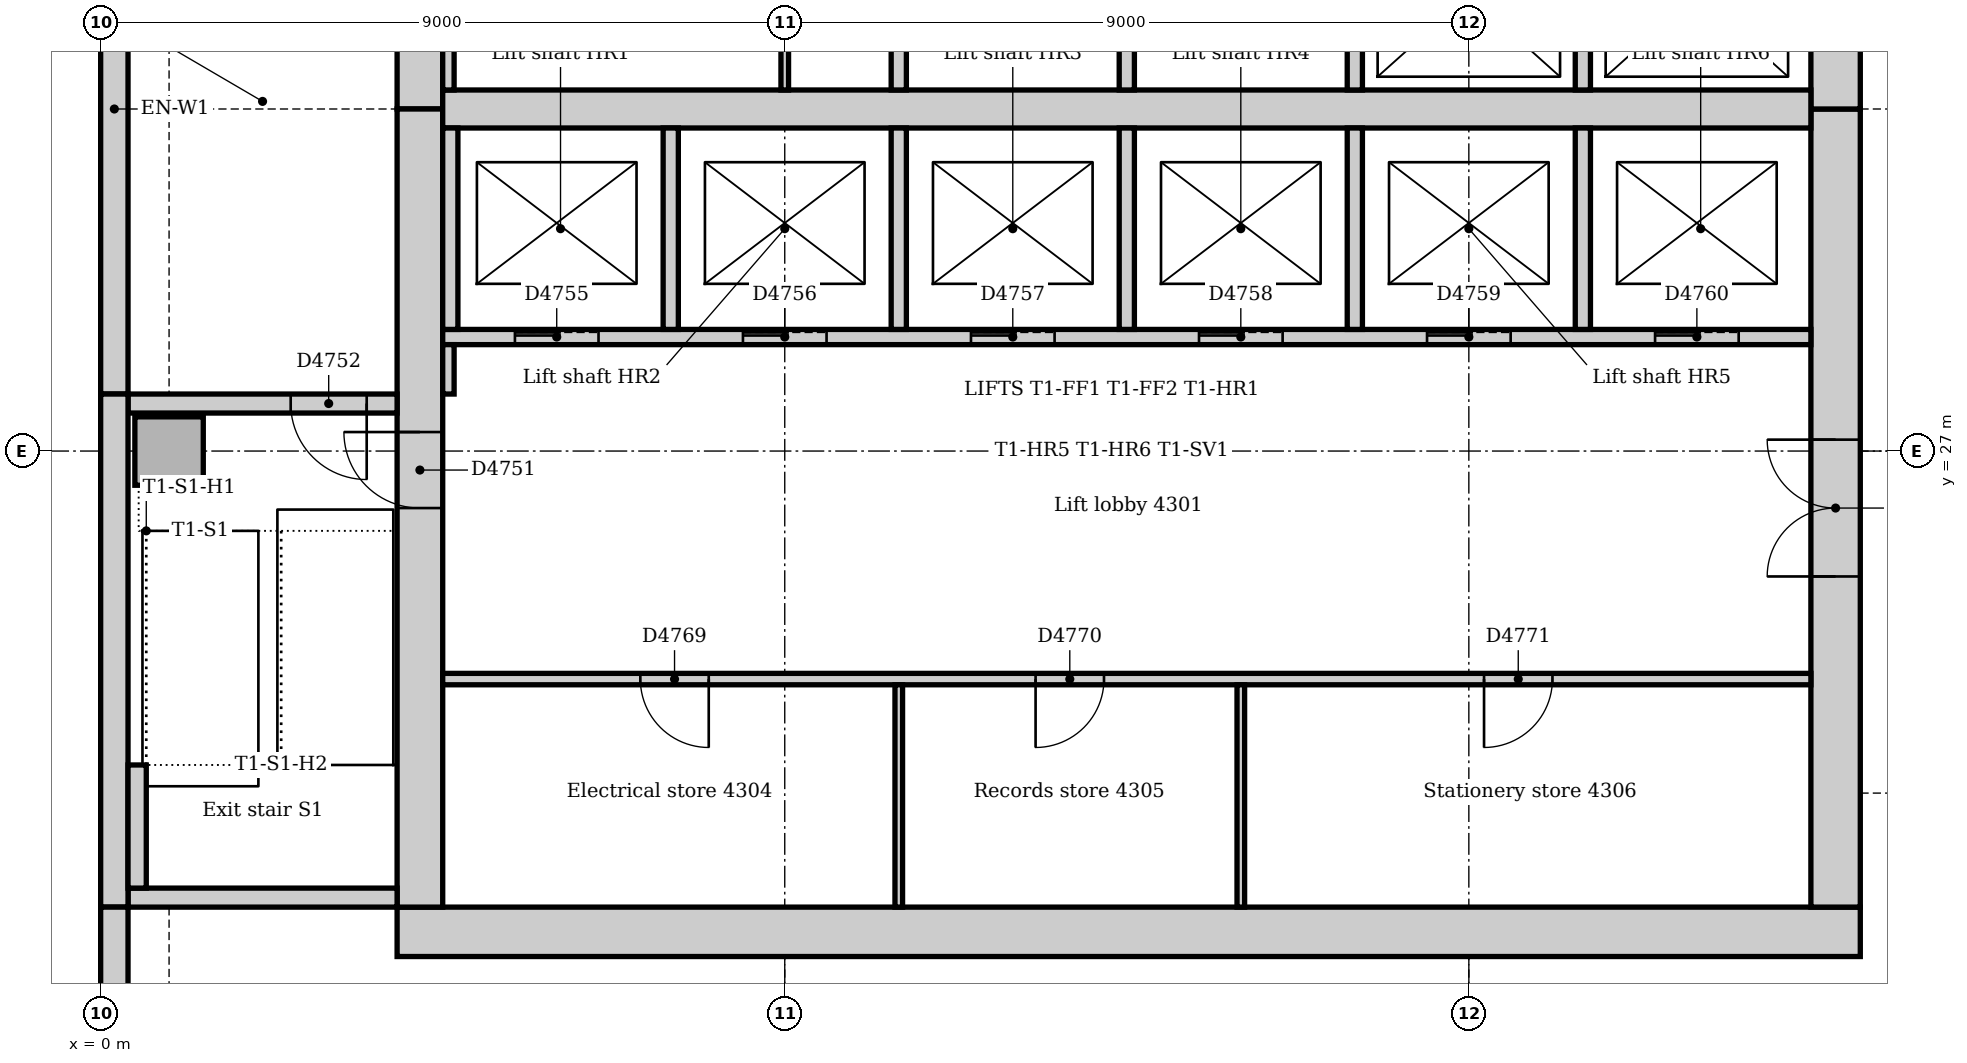
"""IFC4 building model, lengths in metres.
Left out: names, types, materials, properties, quantities, classifications, styles, units other than length and angle.
Written with IfcOpenShell. Run it as: python <this file> out.ifc"""

import sys

from ifc_helpers import new_model, si_unit, direction, frame, frame_2d, origin, origin_2d, place, context, subcontext, project, spatial, rectangle, extrude, element, fill, save


model = new_model("IFC4")
c1 = context("Model", 3, precision=1e-05, world=origin(), true_north=direction((0.0, 1.0)))
c2 = subcontext(c1, "Body", "Model", "MODEL_VIEW")
j1 = project(units=[si_unit("LENGTHUNIT", "METRE"), si_unit("PLANEANGLEUNIT", "RADIAN")], contexts=[c1])
p1 = place(None, origin())
s1 = spatial("IfcSite", under=j1, at=p1, CompositionType="ELEMENT")
p2 = place(p1, origin())
s2 = spatial("IfcBuilding", under=s1, at=p2, CompositionType="ELEMENT")
p3 = place(p2, frame((0.0, 0.0, 181.0)))
s3 = spatial("IfcBuildingStorey", under=s2, at=p3, CompositionType="ELEMENT", Elevation=181.0)
p4 = place(p3, frame((3.9, 20.675, 0.0), z_axis=(0.0, 0.0, 1.0), x_axis=(1.0, 0.0, 0.0)))
e1 = element("IfcWall", 1, at=p4, inside=s3, PredefinedType="SOLIDWALL", context=c2, shape_type="SweptSolid", body=[
    extrude(rectangle(XDim=19.25, YDim=0.65, at=frame_2d((9.625, 0.0))), origin(), (0.0, 0.0, 1.0), 4.0),
])
p5 = place(p3, frame((22.825, 21.0, 0.0), z_axis=(0.0, 0.0, 1.0), x_axis=(0.0, 1.0, 0.0)))
e2 = element("IfcWall", 2, at=p5, inside=s3, PredefinedType="SOLIDWALL", context=c2, shape_type="SweptSolid", body=[
    extrude(rectangle(XDim=10.5, YDim=0.65, at=frame_2d((5.25, 0.0))), origin(), (0.0, 0.0, 1.0), 4.0),
])
p6 = place(p5, frame((4.35, 0.0, 0.0)))
e3 = element("IfcOpeningElement", 3, at=p6, cuts=e2, PredefinedType="OPENING", context=c2, shape_type="SweptSolid", body=[
    extrude(rectangle(XDim=1.8, YDim=2.1, at=frame_2d((0.9, 1.05))), frame((0.0, 0.335, 0.0), z_axis=(0.0, -1.0, 0.0), x_axis=(1.0, 0.0, 0.0)), (0.0, 0.0, 1.0), 0.67),
])
p7 = place(p3, frame((22.825, 31.5, 0.0), z_axis=(0.0, 0.0, 1.0), x_axis=(0.0, 1.0, 0.0)))
e4 = element("IfcWall", 4, at=p7, inside=s3, PredefinedType="SOLIDWALL", context=c2, shape_type="SweptSolid", body=[
    extrude(rectangle(XDim=10.5, YDim=0.65, at=frame_2d((5.25, 0.0))), origin(), (0.0, 0.0, 1.0), 4.0),
])
p8 = place(p7, frame((3.15, 0.0, 0.0)))
e5 = element("IfcOpeningElement", 5, at=p8, cuts=e4, PredefinedType="OPENING", context=c2, shape_type="SweptSolid", body=[
    extrude(rectangle(XDim=1.0, YDim=2.1, at=frame_2d((0.5, 1.05))), frame((0.0, 0.335, 0.0), z_axis=(0.0, -1.0, 0.0), x_axis=(1.0, 0.0, 0.0)), (0.0, 0.0, 1.0), 0.67),
])
p9 = place(p7, frame((5.2, 0.0, 0.0)))
e6 = element("IfcOpeningElement", 6, at=p9, cuts=e4, PredefinedType="OPENING", context=c2, shape_type="SweptSolid", body=[
    extrude(rectangle(XDim=1.0, YDim=2.1, at=frame_2d((0.5, 1.05))), frame((0.0, 0.335, 0.0), z_axis=(0.0, -1.0, 0.0), x_axis=(1.0, 0.0, 0.0)), (0.0, 0.0, 1.0), 0.67),
])
p10 = place(p3, frame((4.2, 42.0, 0.0), z_axis=(0.0, 0.0, 1.0), x_axis=(0.0, -1.0, 0.0)))
e7 = element("IfcWall", 7, at=p10, inside=s3, PredefinedType="SOLIDWALL", context=c2, shape_type="SweptSolid", body=[
    extrude(rectangle(XDim=10.5, YDim=0.6, at=frame_2d((5.25, 0.0))), origin(), (0.0, 0.0, 1.0), 4.0),
])
p11 = place(p10, frame((5.3, 0.0, 0.0)))
e8 = element("IfcOpeningElement", 8, at=p11, cuts=e7, PredefinedType="OPENING", context=c2, shape_type="SweptSolid", body=[
    extrude(rectangle(XDim=1.0, YDim=2.1, at=frame_2d((0.5, 1.05))), frame((0.0, 0.31, 0.0), z_axis=(0.0, -1.0, 0.0), x_axis=(1.0, 0.0, 0.0)), (0.0, 0.0, 1.0), 0.62),
])
p12 = place(p3, frame((4.2, 31.5, 0.0), z_axis=(0.0, 0.0, 1.0), x_axis=(0.0, -1.0, 0.0)))
e9 = element("IfcWall", 9, at=p12, inside=s3, PredefinedType="SOLIDWALL", context=c2, shape_type="SweptSolid", body=[
    extrude(rectangle(XDim=10.5, YDim=0.6, at=frame_2d((5.25, 0.0))), origin(), (0.0, 0.0, 1.0), 4.0),
])
p13 = place(p12, frame((4.25, 0.0, 0.0)))
e10 = element("IfcOpeningElement", 10, at=p13, cuts=e9, PredefinedType="OPENING", context=c2, shape_type="SweptSolid", body=[
    extrude(rectangle(XDim=1.0, YDim=2.1, at=frame_2d((0.5, 1.05))), frame((0.0, 0.31, 0.0), z_axis=(0.0, -1.0, 0.0), x_axis=(1.0, 0.0, 0.0)), (0.0, 0.0, 1.0), 0.62),
])
p14 = place(p3, frame((4.5, 31.5, 0.0), z_axis=(0.0, 0.0, 1.0), x_axis=(1.0, 0.0, 0.0)))
e11 = element("IfcWall", 11, at=p14, inside=s3, PredefinedType="SOLIDWALL", context=c2, shape_type="SweptSolid", body=[
    extrude(rectangle(XDim=18.0, YDim=0.5, at=frame_2d((9.0, 0.0))), origin(), (0.0, 0.0, 1.0), 4.0),
])
p15 = place(p3, frame((0.36, 21.125, 0.0), z_axis=(0.0, 0.0, 1.0), x_axis=(1.0, 0.0, 0.0)))
e12 = element("IfcWall", 12, at=p15, inside=s3, PredefinedType="SOLIDWALL", context=c2, shape_type="SweptSolid", body=[
    extrude(rectangle(XDim=3.54, YDim=0.25, at=frame_2d((1.77, 0.0))), origin(), (0.0, 0.0, 1.0), 4.0),
])
p16 = place(p3, frame((3.9, 27.625, 0.0), z_axis=(0.0, 0.0, 1.0), x_axis=(-1.0, 0.0, 0.0)))
e13 = element("IfcWall", 13, at=p16, inside=s3, PredefinedType="SOLIDWALL", context=c2, shape_type="SweptSolid", body=[
    extrude(rectangle(XDim=3.54, YDim=0.25, at=frame_2d((1.77, 0.0))), origin(), (0.0, 0.0, 1.0), 4.0),
])
p17 = place(p16, frame((0.4, 0.0, 0.0)))
e14 = element("IfcOpeningElement", 14, at=p17, cuts=e13, PredefinedType="OPENING", context=c2, shape_type="SweptSolid", body=[
    extrude(rectangle(XDim=1.0, YDim=2.1, at=frame_2d((0.5, 1.05))), frame((0.0, 0.135, 0.0), z_axis=(0.0, -1.0, 0.0), x_axis=(1.0, 0.0, 0.0)), (0.0, 0.0, 1.0), 0.27),
])
p18 = place(p3, frame((0.9, 27.0, 0.0), z_axis=(0.0, 0.0, 1.0), x_axis=(1.0, 0.0, 0.0)))
e15 = element("IfcColumn", 15, at=p18, inside=s3, PredefinedType="COLUMN", context=c2, shape_type="SweptSolid", body=[
    extrude(rectangle(XDim=0.9, YDim=0.9, at=origin_2d()), origin(), (0.0, 0.0, 1.0), 4.0),
])
p19 = place(p3, frame((0.18, 35.25, 0.0), z_axis=(0.0, 0.0, 1.0), x_axis=(0.0, -1.0, 0.0)))
e16 = element("IfcWall", 16, at=p19, inside=s3, PredefinedType="STANDARD", context=c2, shape_type="SweptSolid", body=[
    extrude(rectangle(XDim=7.5, YDim=0.36, at=frame_2d((3.75, 0.0))), origin(), (0.0, 0.0, 1.0), 3.85),
])
p20 = place(p3, frame((0.18, 27.75, 0.0), z_axis=(0.0, 0.0, 1.0), x_axis=(0.0, -1.0, 0.0)))
e17 = element("IfcWall", 17, at=p20, inside=s3, PredefinedType="STANDARD", context=c2, shape_type="SweptSolid", body=[
    extrude(rectangle(XDim=6.75, YDim=0.36, at=frame_2d((3.375, 0.0))), origin(), (0.0, 0.0, 1.0), 3.85),
])
p21 = place(p3, frame((0.18, 21.0, 0.0), z_axis=(0.0, 0.0, 1.0), x_axis=(0.0, -1.0, 0.0)))
e18 = element("IfcWall", 18, at=p21, inside=s3, PredefinedType="STANDARD", context=c2, shape_type="SweptSolid", body=[
    extrude(rectangle(XDim=7.757, YDim=0.36, at=frame_2d((3.879, 0.0))), origin(), (0.0, 0.0, 1.0), 3.85),
])
p22 = place(p21, frame((1.35, 0.0, 0.9)))
e19 = element("IfcOpeningElement", 19, at=p22, cuts=e18, PredefinedType="OPENING", context=c2, shape_type="SweptSolid", body=[
    extrude(rectangle(XDim=3.3, YDim=1.6, at=frame_2d((1.65, 0.8))), frame((0.0, 0.19, 0.0), z_axis=(0.0, -1.0, 0.0), x_axis=(1.0, 0.0, 0.0)), (0.0, 0.0, 1.0), 0.38),
])
p23 = place(p3, frame((0.48, 21.25, 0.0), z_axis=(0.0, 0.0, 1.0), x_axis=(0.0, 1.0, 0.0)))
e20 = element("IfcWall", 20, at=p23, inside=s3, PredefinedType="STANDARD", context=c2, shape_type="SweptSolid", body=[
    extrude(rectangle(XDim=1.62, YDim=0.24, at=frame_2d((0.81, 0.0))), origin(), (0.0, 0.0, 1.0), 4.0),
])
p24 = place(p3, frame((4.5, 28.5, 0.0), z_axis=(0.0, 0.0, 1.0), x_axis=(1.0, 0.0, 0.0)))
e21 = element("IfcWall", 21, at=p24, inside=s3, PredefinedType="PARTITIONING", context=c2, shape_type="SweptSolid", body=[
    extrude(rectangle(XDim=18.0, YDim=0.2, at=frame_2d((9.0, 0.0))), origin(), (0.0, 0.0, 1.0), 3.85),
])
p25 = place(p24, frame((0.95, 0.0, 0.0)))
e22 = element("IfcOpeningElement", 22, at=p25, cuts=e21, PredefinedType="OPENING", context=c2, shape_type="SweptSolid", body=[
    extrude(rectangle(XDim=1.1, YDim=2.1, at=frame_2d((0.55, 1.05))), frame((0.0, 0.11, 0.0), z_axis=(0.0, -1.0, 0.0), x_axis=(1.0, 0.0, 0.0)), (0.0, 0.0, 1.0), 0.22),
])
p26 = place(p24, frame((3.95, 0.0, 0.0)))
e23 = element("IfcOpeningElement", 23, at=p26, cuts=e21, PredefinedType="OPENING", context=c2, shape_type="SweptSolid", body=[
    extrude(rectangle(XDim=1.1, YDim=2.1, at=frame_2d((0.55, 1.05))), frame((0.0, 0.11, 0.0), z_axis=(0.0, -1.0, 0.0), x_axis=(1.0, 0.0, 0.0)), (0.0, 0.0, 1.0), 0.22),
])
p27 = place(p24, frame((6.95, 0.0, 0.0)))
e24 = element("IfcOpeningElement", 24, at=p27, cuts=e21, PredefinedType="OPENING", context=c2, shape_type="SweptSolid", body=[
    extrude(rectangle(XDim=1.1, YDim=2.1, at=frame_2d((0.55, 1.05))), frame((0.0, 0.11, 0.0), z_axis=(0.0, -1.0, 0.0), x_axis=(1.0, 0.0, 0.0)), (0.0, 0.0, 1.0), 0.22),
])
p28 = place(p24, frame((9.95, 0.0, 0.0)))
e25 = element("IfcOpeningElement", 25, at=p28, cuts=e21, PredefinedType="OPENING", context=c2, shape_type="SweptSolid", body=[
    extrude(rectangle(XDim=1.1, YDim=2.1, at=frame_2d((0.55, 1.05))), frame((0.0, 0.11, 0.0), z_axis=(0.0, -1.0, 0.0), x_axis=(1.0, 0.0, 0.0)), (0.0, 0.0, 1.0), 0.22),
])
p29 = place(p24, frame((12.95, 0.0, 0.0)))
e26 = element("IfcOpeningElement", 26, at=p29, cuts=e21, PredefinedType="OPENING", context=c2, shape_type="SweptSolid", body=[
    extrude(rectangle(XDim=1.1, YDim=2.1, at=frame_2d((0.55, 1.05))), frame((0.0, 0.11, 0.0), z_axis=(0.0, -1.0, 0.0), x_axis=(1.0, 0.0, 0.0)), (0.0, 0.0, 1.0), 0.22),
])
p30 = place(p24, frame((15.95, 0.0, 0.0)))
e27 = element("IfcOpeningElement", 27, at=p30, cuts=e21, PredefinedType="OPENING", context=c2, shape_type="SweptSolid", body=[
    extrude(rectangle(XDim=1.1, YDim=2.1, at=frame_2d((0.55, 1.05))), frame((0.0, 0.11, 0.0), z_axis=(0.0, -1.0, 0.0), x_axis=(1.0, 0.0, 0.0)), (0.0, 0.0, 1.0), 0.22),
])
for number, where, z_axis, x_axis in (
    (28, (10.5, 28.6, 0.0), (0.0, 0.0, 1.0), (0.0, 1.0, 0.0)),
    (29, (10.5, 31.75, 0.0), (0.0, 0.0, 1.0), (0.0, 1.0, 0.0)),
    (30, (13.5, 28.6, 0.0), (0.0, 0.0, 1.0), (0.0, 1.0, 0.0)),
    (31, (13.5, 31.75, 0.0), (0.0, 0.0, 1.0), (0.0, 1.0, 0.0)),
    (32, (16.5, 28.6, 0.0), (0.0, 0.0, 1.0), (0.0, 1.0, 0.0)),
    (33, (16.5, 31.75, 0.0), (0.0, 0.0, 1.0), (0.0, 1.0, 0.0)),
    (34, (19.5, 28.6, 0.0), (0.0, 0.0, 1.0), (0.0, 1.0, 0.0)),
    (35, (19.5, 31.75, 0.0), (0.0, 0.0, 1.0), (0.0, 1.0, 0.0)),
    (36, (4.6, 28.6, 0.0), (0.0, 0.0, 1.0), (0.0, 1.0, 0.0)),
    (37, (7.5, 28.6, 0.0), (0.0, 0.0, 1.0), (0.0, 1.0, 0.0)),
):
    element("IfcWall", number, at=place(p3, frame(where, z_axis=z_axis, x_axis=x_axis)), inside=s3, PredefinedType="PARTITIONING", context=c2, shape_type="SweptSolid", body=[
        extrude(rectangle(XDim=2.65, YDim=0.2, at=frame_2d((1.325, 0.0))), origin(), (0.0, 0.0, 1.0), 3.85),
    ])
p31 = place(p3, frame((4.5, 24.0, 0.0), z_axis=(0.0, 0.0, 1.0), x_axis=(1.0, 0.0, 0.0)))
e38 = element("IfcWall", 38, at=p31, inside=s3, PredefinedType="PARTITIONING", context=c2, shape_type="SweptSolid", body=[
    extrude(rectangle(XDim=18.0, YDim=0.15, at=frame_2d((9.0, 0.0))), origin(), (0.0, 0.0, 1.0), 3.85),
])
p32 = place(p31, frame((2.6, 0.0, 0.0)))
e39 = element("IfcOpeningElement", 39, at=p32, cuts=e38, PredefinedType="OPENING", context=c2, shape_type="SweptSolid", body=[
    extrude(rectangle(XDim=0.9, YDim=2.1, at=frame_2d((0.45, 1.05))), frame((0.0, 0.085, 0.0), z_axis=(0.0, -1.0, 0.0), x_axis=(1.0, 0.0, 0.0)), (0.0, 0.0, 1.0), 0.17),
])
p33 = place(p31, frame((7.8, 0.0, 0.0)))
e40 = element("IfcOpeningElement", 40, at=p33, cuts=e38, PredefinedType="OPENING", context=c2, shape_type="SweptSolid", body=[
    extrude(rectangle(XDim=0.9, YDim=2.1, at=frame_2d((0.45, 1.05))), frame((0.0, 0.085, 0.0), z_axis=(0.0, -1.0, 0.0), x_axis=(1.0, 0.0, 0.0)), (0.0, 0.0, 1.0), 0.17),
])
p34 = place(p31, frame((13.7, 0.0, 0.0)))
e41 = element("IfcOpeningElement", 41, at=p34, cuts=e38, PredefinedType="OPENING", context=c2, shape_type="SweptSolid", body=[
    extrude(rectangle(XDim=0.9, YDim=2.1, at=frame_2d((0.45, 1.05))), frame((0.0, 0.085, 0.0), z_axis=(0.0, -1.0, 0.0), x_axis=(1.0, 0.0, 0.0)), (0.0, 0.0, 1.0), 0.17),
])
p35 = place(p3, frame((4.575, 31.75, 0.0), z_axis=(0.0, 0.0, 1.0), x_axis=(0.0, 1.0, 0.0)))
e42 = element("IfcWall", 42, at=p35, inside=s3, PredefinedType="PARTITIONING", context=c2, shape_type="SweptSolid", body=[
    extrude(rectangle(XDim=2.675, YDim=0.15, at=frame_2d((1.337, 0.0))), origin(), (0.0, 0.0, 1.0), 3.85),
])
p36 = place(p3, frame((4.575, 27.75, 0.0), z_axis=(0.0, 0.0, 1.0), x_axis=(0.0, 1.0, 0.0)))
e43 = element("IfcWall", 43, at=p36, inside=s3, PredefinedType="PARTITIONING", context=c2, shape_type="SweptSolid", body=[
    extrude(rectangle(XDim=0.65, YDim=0.15, at=frame_2d((0.325, 0.0))), origin(), (0.0, 0.0, 1.0), 3.85),
])
p37 = place(p3, frame((9.0, 31.75, 0.0), z_axis=(0.0, 0.0, 1.0), x_axis=(0.0, 1.0, 0.0)))
e44 = element("IfcWall", 44, at=p37, inside=s3, PredefinedType="PARTITIONING", context=c2, shape_type="SweptSolid", body=[
    extrude(rectangle(XDim=2.675, YDim=0.1, at=frame_2d((1.337, 0.0))), origin(), (0.0, 0.0, 1.0), 3.85),
])
for number, where, z_axis, x_axis in (
    (45, (10.5, 21.0, 0.0), (0.0, 0.0, 1.0), (0.0, 1.0, 0.0)),
    (46, (15.0, 21.0, 0.0), (0.0, 0.0, 1.0), (0.0, 1.0, 0.0)),
):
    element("IfcWall", number, at=place(p3, frame(where, z_axis=z_axis, x_axis=x_axis)), inside=s3, PredefinedType="PARTITIONING", context=c2, shape_type="SweptSolid", body=[
        extrude(rectangle(XDim=2.925, YDim=0.1, at=frame_2d((1.462, 0.0))), origin(), (0.0, 0.0, 1.0), 3.85),
    ])
p38 = place(p13, frame((1.0, 0.0, 0.0), z_axis=(0.0, 0.0, 1.0), x_axis=(-1.0, 0.0, 0.0)))
e47 = element("IfcDoor", 47, at=p38, inside=s3, OperationType="SINGLE_SWING_RIGHT", PredefinedType="DOOR", context=c2, shape_type="SweptSolid", body=[
    extrude(rectangle(XDim=1.0, YDim=2.1, at=frame_2d((0.5, 1.05))), frame((0.0, 0.025, 0.0), z_axis=(0.0, -1.0, 0.0), x_axis=(1.0, 0.0, 0.0)), (0.0, 0.0, 1.0), 0.05),
])
fill(e10, e47)
p39 = place(p17, origin())
e48 = element("IfcDoor", 48, at=p39, inside=s3, OperationType="SINGLE_SWING_LEFT", PredefinedType="DOOR", context=c2, shape_type="SweptSolid", body=[
    extrude(rectangle(XDim=1.0, YDim=2.1, at=frame_2d((0.5, 1.05))), frame((0.0, 0.025, 0.0), z_axis=(0.0, -1.0, 0.0), x_axis=(1.0, 0.0, 0.0)), (0.0, 0.0, 1.0), 0.05),
])
fill(e14, e48)
p40 = place(p25, origin())
e49 = element("IfcDoor", 49, at=p40, inside=s3, OperationType="SLIDING_TO_LEFT", PredefinedType="DOOR", context=c2, shape_type="SweptSolid", body=[
    extrude(rectangle(XDim=1.1, YDim=2.1, at=frame_2d((0.55, 1.05))), frame((0.0, 0.025, 0.0), z_axis=(0.0, -1.0, 0.0), x_axis=(1.0, 0.0, 0.0)), (0.0, 0.0, 1.0), 0.05),
])
fill(e22, e49)
p41 = place(p26, origin())
e50 = element("IfcDoor", 50, at=p41, inside=s3, OperationType="SLIDING_TO_LEFT", PredefinedType="DOOR", context=c2, shape_type="SweptSolid", body=[
    extrude(rectangle(XDim=1.1, YDim=2.1, at=frame_2d((0.55, 1.05))), frame((0.0, 0.025, 0.0), z_axis=(0.0, -1.0, 0.0), x_axis=(1.0, 0.0, 0.0)), (0.0, 0.0, 1.0), 0.05),
])
fill(e23, e50)
p42 = place(p27, origin())
e51 = element("IfcDoor", 51, at=p42, inside=s3, OperationType="SLIDING_TO_LEFT", PredefinedType="DOOR", context=c2, shape_type="SweptSolid", body=[
    extrude(rectangle(XDim=1.1, YDim=2.1, at=frame_2d((0.55, 1.05))), frame((0.0, 0.025, 0.0), z_axis=(0.0, -1.0, 0.0), x_axis=(1.0, 0.0, 0.0)), (0.0, 0.0, 1.0), 0.05),
])
fill(e24, e51)
p43 = place(p28, origin())
e52 = element("IfcDoor", 52, at=p43, inside=s3, OperationType="SLIDING_TO_LEFT", PredefinedType="DOOR", context=c2, shape_type="SweptSolid", body=[
    extrude(rectangle(XDim=1.1, YDim=2.1, at=frame_2d((0.55, 1.05))), frame((0.0, 0.025, 0.0), z_axis=(0.0, -1.0, 0.0), x_axis=(1.0, 0.0, 0.0)), (0.0, 0.0, 1.0), 0.05),
])
fill(e25, e52)
p44 = place(p29, origin())
e53 = element("IfcDoor", 53, at=p44, inside=s3, OperationType="SLIDING_TO_LEFT", PredefinedType="DOOR", context=c2, shape_type="SweptSolid", body=[
    extrude(rectangle(XDim=1.1, YDim=2.1, at=frame_2d((0.55, 1.05))), frame((0.0, 0.025, 0.0), z_axis=(0.0, -1.0, 0.0), x_axis=(1.0, 0.0, 0.0)), (0.0, 0.0, 1.0), 0.05),
])
fill(e26, e53)
p45 = place(p30, origin())
e54 = element("IfcDoor", 54, at=p45, inside=s3, OperationType="SLIDING_TO_LEFT", PredefinedType="DOOR", context=c2, shape_type="SweptSolid", body=[
    extrude(rectangle(XDim=1.1, YDim=2.1, at=frame_2d((0.55, 1.05))), frame((0.0, 0.025, 0.0), z_axis=(0.0, -1.0, 0.0), x_axis=(1.0, 0.0, 0.0)), (0.0, 0.0, 1.0), 0.05),
])
fill(e27, e54)
p46 = place(p6, origin())
e55 = element("IfcDoor", 55, at=p46, inside=s3, OperationType="DOUBLE_DOOR_DOUBLE_SWING", PredefinedType="DOOR", context=c2, shape_type="SweptSolid", body=[
    extrude(rectangle(XDim=1.8, YDim=2.1, at=frame_2d((0.9, 1.05))), frame((0.0, 0.025, 0.0), z_axis=(0.0, -1.0, 0.0), x_axis=(1.0, 0.0, 0.0)), (0.0, 0.0, 1.0), 0.05),
])
fill(e3, e55)
p47 = place(p32, frame((0.9, 0.0, 0.0), z_axis=(0.0, 0.0, 1.0), x_axis=(-1.0, 0.0, 0.0)))
e56 = element("IfcDoor", 56, at=p47, inside=s3, OperationType="SINGLE_SWING_LEFT", PredefinedType="DOOR", context=c2, shape_type="SweptSolid", body=[
    extrude(rectangle(XDim=0.9, YDim=2.1, at=frame_2d((0.45, 1.05))), frame((0.0, 0.025, 0.0), z_axis=(0.0, -1.0, 0.0), x_axis=(1.0, 0.0, 0.0)), (0.0, 0.0, 1.0), 0.05),
])
fill(e39, e56)
p48 = place(p33, frame((0.9, 0.0, 0.0), z_axis=(0.0, 0.0, 1.0), x_axis=(-1.0, 0.0, 0.0)))
e57 = element("IfcDoor", 57, at=p48, inside=s3, OperationType="SINGLE_SWING_RIGHT", PredefinedType="DOOR", context=c2, shape_type="SweptSolid", body=[
    extrude(rectangle(XDim=0.9, YDim=2.1, at=frame_2d((0.45, 1.05))), frame((0.0, 0.025, 0.0), z_axis=(0.0, -1.0, 0.0), x_axis=(1.0, 0.0, 0.0)), (0.0, 0.0, 1.0), 0.05),
])
fill(e40, e57)
p49 = place(p34, frame((0.9, 0.0, 0.0), z_axis=(0.0, 0.0, 1.0), x_axis=(-1.0, 0.0, 0.0)))
e58 = element("IfcDoor", 58, at=p49, inside=s3, OperationType="SINGLE_SWING_RIGHT", PredefinedType="DOOR", context=c2, shape_type="SweptSolid", body=[
    extrude(rectangle(XDim=0.9, YDim=2.1, at=frame_2d((0.45, 1.05))), frame((0.0, 0.025, 0.0), z_axis=(0.0, -1.0, 0.0), x_axis=(1.0, 0.0, 0.0)), (0.0, 0.0, 1.0), 0.05),
])
fill(e41, e58)
save(model, sys.argv[1])
